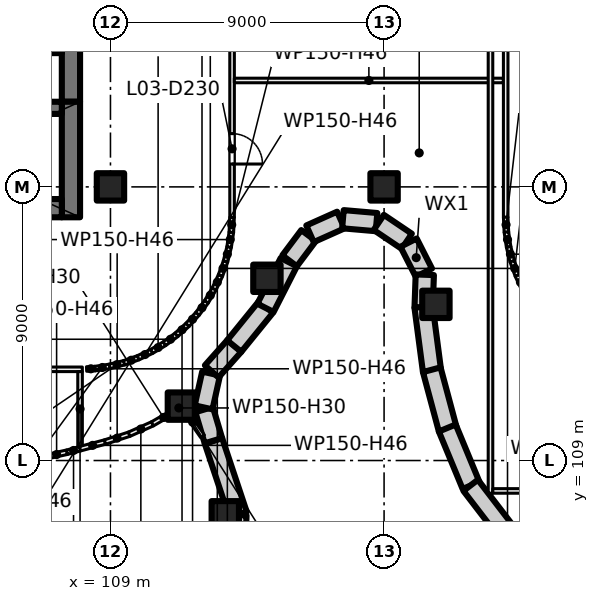
"""IFC4 building model, lengths in metres.
Left out: names, types, materials, properties, quantities, classifications, styles, units other than length and angle.
Written with IfcOpenShell. Run it as: python <this file> out.ifc"""

import sys

from ifc_helpers import new_model, si_unit, direction, frame, frame_2d, origin, origin_2d, place, context, subcontext, project, spatial, rectangle, extrude, element, fill, save


model = new_model("IFC4")
c1 = context("Model", 3, precision=1e-05, world=origin(), true_north=direction((0.0, 1.0)))
c2 = subcontext(c1, "Body", "Model", "MODEL_VIEW")
j1 = project(units=[si_unit("LENGTHUNIT", "METRE"), si_unit("PLANEANGLEUNIT", "RADIAN")], contexts=[c1])
p1 = place(None, origin())
s1 = spatial("IfcSite", under=j1, at=p1, CompositionType="ELEMENT")
p2 = place(p1, origin())
s2 = spatial("IfcBuilding", under=s1, at=p2, CompositionType="ELEMENT")
p3 = place(p2, frame((0.0, 0.0, 17.5)))
s3 = spatial("IfcBuildingStorey", under=s2, at=p3, CompositionType="ELEMENT", Elevation=17.5)
for number, where, z_axis, x_axis in (
    (1, (109.0, 118.0, 0.0), (0.0, 0.0, 1.0), (1.0, 0.0, 0.0)),
    (2, (118.0, 118.0, 0.0), (0.0, 0.0, 1.0), (1.0, 0.0, 0.0)),
    (3, (119.705, 114.137, 0.0), (0.0, 0.0, 1.0), (1.0, 0.0, 0.0)),
    (4, (114.146, 114.994, 0.0), (0.0, 0.0, 1.0), (1.0, 0.0, 0.0)),
    (5, (112.777, 107.215, 0.0), (0.0, 0.0, 1.0), (1.0, 0.0, 0.0)),
    (6, (111.333, 110.79, 0.0), (0.0, 0.0, 1.0), (1.0, 0.0, 0.0)),
):
    element("IfcColumn", number, at=place(p3, frame(where, z_axis=z_axis, x_axis=x_axis)), inside=s3, PredefinedType="COLUMN", context=c2, shape_type="SweptSolid", body=[
        extrude(rectangle(XDim=0.9, YDim=0.9, at=origin_2d()), origin(), (0.0, 0.0, 1.0), 5.0),
    ])
p4 = place(p3, frame((107.7, 135.2, 0.0), z_axis=(0.0, 0.0, 1.0), x_axis=(0.0, -1.0, 0.0)))
e7 = element("IfcWall", 7, at=p4, inside=s3, PredefinedType="SHEAR", context=c2, shape_type="SweptSolid", body=[
    extrude(rectangle(XDim=14.4, YDim=0.6, at=frame_2d((7.2, 0.0))), origin(), (0.0, 0.0, 1.0), 5.0),
])
p5 = place(p3, frame((107.7, 120.8, 0.0), z_axis=(0.0, 0.0, 1.0), x_axis=(0.0, -1.0, 0.0)))
e8 = element("IfcWall", 8, at=p5, inside=s3, PredefinedType="SHEAR", context=c2, shape_type="SweptSolid", body=[
    extrude(rectangle(XDim=3.8, YDim=0.6, at=frame_2d((1.9, 0.0))), origin(), (0.0, 0.0, 1.0), 5.0),
])
p6 = place(p3, frame((107.4, 117.3, 0.0), z_axis=(0.0, 0.0, 1.0), x_axis=(-1.0, 0.0, 0.0)))
e9 = element("IfcWall", 9, at=p6, inside=s3, PredefinedType="SHEAR", context=c2, shape_type="SweptSolid", body=[
    extrude(rectangle(XDim=7.8, YDim=0.6, at=frame_2d((3.9, 0.0))), origin(), (0.0, 0.0, 1.0), 5.0),
])
p7 = place(p3, frame((107.4, 120.6, 0.0), z_axis=(0.0, 0.0, 1.0), x_axis=(-1.0, 0.0, 0.0)))
e10 = element("IfcWall", 10, at=p7, inside=s3, PredefinedType="SHEAR", context=c2, shape_type="SweptSolid", body=[
    extrude(rectangle(XDim=7.8, YDim=0.4, at=frame_2d((3.9, 0.0))), origin(), (0.0, 0.0, 1.0), 5.0),
])
p8 = place(p3, frame((107.4, 122.6, 0.0), z_axis=(0.0, 0.0, 1.0), x_axis=(-1.0, 0.0, 0.0)))
e11 = element("IfcWall", 11, at=p8, inside=s3, PredefinedType="SHEAR", context=c2, shape_type="SweptSolid", body=[
    extrude(rectangle(XDim=12.2, YDim=0.4, at=frame_2d((6.1, 0.0))), origin(), (0.0, 0.0, 1.0), 5.0),
])
p9 = place(p8, frame((7.9, 0.0, 0.0)))
e12 = element("IfcOpeningElement", 12, at=p9, cuts=e11, PredefinedType="OPENING", context=c2, shape_type="SweptSolid", body=[
    extrude(rectangle(XDim=1.1, YDim=2.1, at=frame_2d((0.55, 1.05))), frame((0.0, 0.21, 0.0), z_axis=(0.0, -1.0, 0.0), x_axis=(1.0, 0.0, 0.0)), (0.0, 0.0, 1.0), 0.42),
])
p10 = place(p3, frame((113.177, 107.207, 0.0), z_axis=(0.0, 0.0, 1.0), x_axis=(-0.042001630397, -0.999117542156, 0.0)))
e13 = element("IfcWall", 13, at=p10, inside=s3, PredefinedType="SOLIDWALL", context=c2, shape_type="SweptSolid", body=[
    extrude(rectangle(XDim=2.436, YDim=0.6, at=frame_2d((1.218, 0.0))), origin(), (0.0, 0.0, 1.0), 4.6),
])
p11 = place(p3, frame((112.388, 109.643, 0.0), z_axis=(0.0, 0.0, 1.0), x_axis=(0.31642839289, -0.948616398853, 0.0)))
e14 = element("IfcWall", 14, at=p11, inside=s3, PredefinedType="SOLIDWALL", context=c2, shape_type="SweptSolid", body=[
    extrude(rectangle(XDim=2.555, YDim=0.6, at=frame_2d((1.278, 0.0))), origin(), (0.0, 0.0, 1.0), 4.6),
])
p12 = place(p3, frame((112.081, 110.676, 0.0), z_axis=(0.0, 0.0, 1.0), x_axis=(0.285396142495, -0.958409641985, 0.0)))
e15 = element("IfcWall", 15, at=p12, inside=s3, PredefinedType="SOLIDWALL", context=c2, shape_type="SweptSolid", body=[
    extrude(rectangle(XDim=1.068, YDim=0.6, at=frame_2d((0.534, 0.0))), origin(), (0.0, 0.0, 1.0), 4.6),
])
p13 = place(p3, frame((112.31, 111.859, 0.0), z_axis=(0.0, 0.0, 1.0), x_axis=(-0.216998636299, -0.976171906912, 0.0)))
e16 = element("IfcWall", 16, at=p13, inside=s3, PredefinedType="SOLIDWALL", context=c2, shape_type="SweptSolid", body=[
    extrude(rectangle(XDim=1.137, YDim=0.6, at=frame_2d((0.569, 0.0))), origin(), (0.0, 0.0, 1.0), 4.6),
])
p14 = place(p3, frame((113.079, 112.774, 0.0), z_axis=(0.0, 0.0, 1.0), x_axis=(-0.664538540083, -0.747253992123, 0.0)))
e17 = element("IfcWall", 17, at=p14, inside=s3, PredefinedType="SOLIDWALL", context=c2, shape_type="SweptSolid", body=[
    extrude(rectangle(XDim=1.127, YDim=0.6, at=frame_2d((0.564, 0.0))), origin(), (0.0, 0.0, 1.0), 4.6),
])
p15 = place(p3, frame((114.115, 114.051, 0.0), z_axis=(0.0, 0.0, 1.0), x_axis=(-0.630015715698, -0.77658238325, 0.0)))
e18 = element("IfcWall", 18, at=p15, inside=s3, PredefinedType="SOLIDWALL", context=c2, shape_type="SweptSolid", body=[
    extrude(rectangle(XDim=1.657, YDim=0.6, at=frame_2d((0.829, 0.0))), origin(), (0.0, 0.0, 1.0), 4.6),
])
p16 = place(p3, frame((114.865, 115.525, 0.0), z_axis=(0.0, 0.0, 1.0), x_axis=(-0.454203210797, -0.890898110505, 0.0)))
e19 = element("IfcWall", 19, at=p16, inside=s3, PredefinedType="SOLIDWALL", context=c2, shape_type="SweptSolid", body=[
    extrude(rectangle(XDim=1.687, YDim=0.6, at=frame_2d((0.844, 0.0))), origin(), (0.0, 0.0, 1.0), 4.6),
])
p17 = place(p3, frame((115.517, 116.4, 0.0), z_axis=(0.0, 0.0, 1.0), x_axis=(-0.60018790921, -0.799859033604, 0.0)))
e20 = element("IfcWall", 20, at=p17, inside=s3, PredefinedType="SOLIDWALL", context=c2, shape_type="SweptSolid", body=[
    extrude(rectangle(XDim=1.039, YDim=0.6, at=frame_2d((0.52, 0.0))), origin(), (0.0, 0.0, 1.0), 4.6),
])
for number, where, z_axis, x_axis in (
    (21, (116.577, 116.91, 0.0), (0.0, 0.0, 1.0), (-0.913, -0.408, 0.0)),
    (22, (117.752, 116.842, 0.0), (0.0, 0.0, 1.0), (-0.996, 0.086, 0.0)),
):
    element("IfcWall", number, at=place(p3, frame(where, z_axis=z_axis, x_axis=x_axis)), inside=s3, PredefinedType="SOLIDWALL", context=c2, shape_type="SweptSolid", body=[
        extrude(rectangle(XDim=1.11, YDim=0.6, at=frame_2d((0.555, 0.0))), origin(), (0.0, 0.0, 1.0), 4.6),
    ])
for number, where, z_axis, x_axis in (
    (23, (118.746, 116.211, 0.0), (0.0, 0.0, 1.0), (-0.829, 0.559, 0.0)),
    (24, (119.309, 115.178, 0.0), (0.0, 0.0, 1.0), (-0.454, 0.891, 0.0)),
):
    element("IfcWall", number, at=place(p3, frame(where, z_axis=z_axis, x_axis=x_axis)), inside=s3, PredefinedType="SOLIDWALL", context=c2, shape_type="SweptSolid", body=[
        extrude(rectangle(XDim=1.109, YDim=0.6, at=frame_2d((0.555, 0.0))), origin(), (0.0, 0.0, 1.0), 4.6),
    ])
p18 = place(p3, frame((119.3, 114.021, 0.0), z_axis=(0.0, 0.0, 1.0), x_axis=(0.035627591166, 0.999365135848, 0.0)))
e25 = element("IfcWall", 25, at=p18, inside=s3, PredefinedType="SOLIDWALL", context=c2, shape_type="SweptSolid", body=[
    extrude(rectangle(XDim=1.09, YDim=0.6, at=frame_2d((0.545, 0.0))), origin(), (0.0, 0.0, 1.0), 4.6),
])
p19 = place(p3, frame((119.576, 111.948, 0.0), z_axis=(0.0, 0.0, 1.0), x_axis=(-0.130558200013, 0.991440646942, 0.0)))
e26 = element("IfcWall", 26, at=p19, inside=s3, PredefinedType="SOLIDWALL", context=c2, shape_type="SweptSolid", body=[
    extrude(rectangle(XDim=2.132, YDim=0.6, at=frame_2d((1.066, 0.0))), origin(), (0.0, 0.0, 1.0), 4.6),
])
p20 = place(p3, frame((120.092, 110.032, 0.0), z_axis=(0.0, 0.0, 1.0), x_axis=(-0.258804467146, 0.965929732323, 0.0)))
e27 = element("IfcWall", 27, at=p20, inside=s3, PredefinedType="SOLIDWALL", context=c2, shape_type="SweptSolid", body=[
    extrude(rectangle(XDim=2.022, YDim=0.6, at=frame_2d((1.011, 0.0))), origin(), (0.0, 0.0, 1.0), 4.6),
])
p21 = place(p3, frame((120.86, 108.181, 0.0), z_axis=(0.0, 0.0, 1.0), x_axis=(-0.382341242798, 0.924021197839, 0.0)))
e28 = element("IfcWall", 28, at=p21, inside=s3, PredefinedType="SOLIDWALL", context=c2, shape_type="SweptSolid", body=[
    extrude(rectangle(XDim=2.044, YDim=0.6, at=frame_2d((1.022, 0.0))), origin(), (0.0, 0.0, 1.0), 4.6),
])
p22 = place(p3, frame((122.135, 106.507, 0.0), z_axis=(0.0, 0.0, 1.0), x_axis=(-0.609052002567, 0.79313029079, 0.0)))
e29 = element("IfcWall", 29, at=p22, inside=s3, PredefinedType="SOLIDWALL", context=c2, shape_type="SweptSolid", body=[
    extrude(rectangle(XDim=2.114, YDim=0.6, at=frame_2d((1.057, 0.0))), origin(), (0.0, 0.0, 1.0), 4.6),
])
p23 = place(p3, frame((108.075, 112.0, 0.0), z_axis=(0.0, 0.0, 1.0), x_axis=(-1.0, 0.0, 0.0)))
e30 = element("IfcWall", 30, at=p23, inside=s3, PredefinedType="PARTITIONING", context=c2, shape_type="SweptSolid", body=[
    extrude(rectangle(XDim=17.077, YDim=0.15, at=frame_2d((8.539, 0.0))), origin(), (0.0, 0.0, 1.0), 4.6),
])
p24 = place(p23, frame((14.823, 0.0, 0.0)))
e31 = element("IfcOpeningElement", 31, at=p24, cuts=e30, PredefinedType="OPENING", context=c2, shape_type="SweptSolid", body=[
    extrude(rectangle(XDim=1.0, YDim=2.1, at=frame_2d((0.5, 1.05))), frame((0.0, 0.085, 0.0), z_axis=(0.0, -1.0, 0.0), x_axis=(1.0, 0.0, 0.0)), (0.0, 0.0, 1.0), 0.17),
])
p25 = place(p23, frame((6.327, 0.0, 0.0)))
e32 = element("IfcOpeningElement", 32, at=p25, cuts=e30, PredefinedType="OPENING", context=c2, shape_type="SweptSolid", body=[
    extrude(rectangle(XDim=1.0, YDim=2.1, at=frame_2d((0.5, 1.05))), frame((0.0, 0.085, 0.0), z_axis=(0.0, -1.0, 0.0), x_axis=(1.0, 0.0, 0.0)), (0.0, 0.0, 1.0), 0.17),
])
p26 = place(p3, frame((106.886, 109.121, 0.0), z_axis=(0.0, 0.0, 1.0), x_axis=(0.976301537339, 0.216414667222, 0.0)))
e33 = element("IfcWall", 33, at=p26, inside=s3, PredefinedType="PARTITIONING", context=c2, shape_type="SweptSolid", body=[
    extrude(rectangle(XDim=0.702, YDim=0.15, at=frame_2d((0.351, 0.0))), origin(), (0.0, 0.0, 1.0), 4.6),
])
p27 = place(p3, frame((107.571, 109.273, 0.0), z_axis=(0.0, 0.0, 1.0), x_axis=(0.965896509383, 0.25892843251, 0.0)))
e34 = element("IfcWall", 34, at=p27, inside=s3, PredefinedType="PARTITIONING", context=c2, shape_type="SweptSolid", body=[
    extrude(rectangle(XDim=0.444, YDim=0.15, at=frame_2d((0.222, 0.0))), origin(), (0.0, 0.0, 1.0), 4.6),
])
p28 = place(p3, frame((108.0, 109.466, 0.0), z_axis=(0.0, 0.0, 1.0), x_axis=(0.0, 1.0, 0.0)))
e35 = element("IfcWall", 35, at=p28, inside=s3, PredefinedType="PARTITIONING", context=c2, shape_type="SweptSolid", body=[
    extrude(rectangle(XDim=2.459, YDim=0.15, at=frame_2d((1.229, 0.0))), origin(), (0.0, 0.0, 1.0), 3.6),
])
p29 = place(p3, frame((108.0, 109.388, 0.0), z_axis=(0.0, 0.0, 1.0), x_axis=(0.965800850795, 0.259285010374, 0.0)))
e36 = element("IfcWall", 36, at=p29, inside=s3, PredefinedType="PARTITIONING", context=c2, shape_type="SweptSolid", body=[
    extrude(rectangle(XDim=0.852, YDim=0.15, at=frame_2d((0.426, 0.0))), origin(), (0.0, 0.0, 1.0), 4.6),
])
p30 = place(p3, frame((108.214, 112.01, 0.0), z_axis=(0.0, 0.0, 1.0), x_axis=(0.99876534507, 0.049676810357, 0.0)))
e37 = element("IfcWall", 37, at=p30, inside=s3, PredefinedType="PARTITIONING", context=c2, shape_type="SweptSolid", body=[
    extrude(rectangle(XDim=0.28, YDim=0.15, at=frame_2d((0.14, 0.0))), origin(), (0.0, 0.0, 1.0), 4.6),
])
p31 = place(p3, frame((108.486, 112.023, 0.0), z_axis=(0.0, 0.0, 1.0), x_axis=(0.988925572052, 0.148412307247, 0.0)))
e38 = element("IfcWall", 38, at=p31, inside=s3, PredefinedType="PARTITIONING", context=c2, shape_type="SweptSolid", body=[
    extrude(rectangle(XDim=0.499, YDim=0.15, at=frame_2d((0.249, 0.0))), origin(), (0.0, 0.0, 1.0), 4.6),
])
p32 = place(p3, frame((108.819, 109.607, 0.0), z_axis=(0.0, 0.0, 1.0), x_axis=(0.95125726357, 0.308398473578, 0.0)))
e39 = element("IfcWall", 39, at=p32, inside=s3, PredefinedType="PARTITIONING", context=c2, shape_type="SweptSolid", body=[
    extrude(rectangle(XDim=0.843, YDim=0.15, at=frame_2d((0.421, 0.0))), origin(), (0.0, 0.0, 1.0), 4.6),
])
p33 = place(p3, frame((108.971, 112.095, 0.0), z_axis=(0.0, 0.0, 1.0), x_axis=(0.970113715952, 0.242650732785, 0.0)))
e40 = element("IfcWall", 40, at=p33, inside=s3, PredefinedType="PARTITIONING", context=c2, shape_type="SweptSolid", body=[
    extrude(rectangle(XDim=0.499, YDim=0.15, at=frame_2d((0.25, 0.0))), origin(), (0.0, 0.0, 1.0), 4.6),
])
p34 = place(p3, frame((109.447, 112.214, 0.0), z_axis=(0.0, 0.0, 1.0), x_axis=(0.941442168887, 0.3371744988, 0.0)))
e41 = element("IfcWall", 41, at=p34, inside=s3, PredefinedType="PARTITIONING", context=c2, shape_type="SweptSolid", body=[
    extrude(rectangle(XDim=0.498, YDim=0.15, at=frame_2d((0.249, 0.0))), origin(), (0.0, 0.0, 1.0), 4.6),
])
p35 = place(p3, frame((109.613, 109.864, 0.0), z_axis=(0.0, 0.0, 1.0), x_axis=(0.913180057383, 0.407556355364, 0.0)))
e42 = element("IfcWall", 42, at=p35, inside=s3, PredefinedType="PARTITIONING", context=c2, shape_type="SweptSolid", body=[
    extrude(rectangle(XDim=0.846, YDim=0.15, at=frame_2d((0.423, 0.0))), origin(), (0.0, 0.0, 1.0), 3.6),
])
p36 = place(p3, frame((109.91, 112.379, 0.0), z_axis=(0.0, 0.0, 1.0), x_axis=(0.903827641978, 0.427896709028, 0.0)))
e43 = element("IfcWall", 43, at=p36, inside=s3, PredefinedType="PARTITIONING", context=c2, shape_type="SweptSolid", body=[
    extrude(rectangle(XDim=0.498, YDim=0.15, at=frame_2d((0.249, 0.0))), origin(), (0.0, 0.0, 1.0), 4.6),
])
p37 = place(p3, frame((110.354, 112.588, 0.0), z_axis=(0.0, 0.0, 1.0), x_axis=(0.85671397893, 0.515791778052, 0.0)))
e44 = element("IfcWall", 44, at=p37, inside=s3, PredefinedType="PARTITIONING", context=c2, shape_type="SweptSolid", body=[
    extrude(rectangle(XDim=0.499, YDim=0.15, at=frame_2d((0.249, 0.0))), origin(), (0.0, 0.0, 1.0), 4.6),
])
p38 = place(p3, frame((110.379, 110.205, 0.0), z_axis=(0.0, 0.0, 1.0), x_axis=(0.865670246418, 0.500614646676, 0.0)))
e45 = element("IfcWall", 45, at=p38, inside=s3, PredefinedType="PARTITIONING", context=c2, shape_type="SweptSolid", body=[
    extrude(rectangle(XDim=0.845, YDim=0.15, at=frame_2d((0.422, 0.0))), origin(), (0.0, 0.0, 1.0), 3.0),
])
p39 = place(p3, frame((110.775, 112.841, 0.0), z_axis=(0.0, 0.0, 1.0), x_axis=(0.80404358372, 0.594570362092, 0.0)))
e46 = element("IfcWall", 46, at=p39, inside=s3, PredefinedType="PARTITIONING", context=c2, shape_type="SweptSolid", body=[
    extrude(rectangle(XDim=0.498, YDim=0.15, at=frame_2d((0.249, 0.0))), origin(), (0.0, 0.0, 1.0), 4.6),
])
p40 = place(p3, frame((111.104, 110.624, 0.0), z_axis=(0.0, 0.0, 1.0), x_axis=(0.810031464643, 0.586386413799, 0.0)))
e47 = element("IfcWall", 47, at=p40, inside=s3, PredefinedType="PARTITIONING", context=c2, shape_type="SweptSolid", body=[
    extrude(rectangle(XDim=0.358, YDim=0.15, at=frame_2d((0.179, 0.0))), origin(), (0.0, 0.0, 1.0), 3.0),
])
p41 = place(p3, frame((111.169, 113.133, 0.0), z_axis=(0.0, 0.0, 1.0), x_axis=(0.742416880587, 0.66993818776, 0.0)))
e48 = element("IfcWall", 48, at=p41, inside=s3, PredefinedType="PARTITIONING", context=c2, shape_type="SweptSolid", body=[
    extrude(rectangle(XDim=0.499, YDim=0.15, at=frame_2d((0.249, 0.0))), origin(), (0.0, 0.0, 1.0), 4.6),
])
p42 = place(p3, frame((111.376, 110.729, 0.0), z_axis=(0.0, 0.0, 1.0), x_axis=(0.573347602385, -0.819312227933, 0.0)))
e49 = element("IfcWall", 49, at=p42, inside=s3, PredefinedType="PARTITIONING", context=c2, shape_type="SweptSolid", body=[
    extrude(rectangle(XDim=1.143, YDim=0.15, at=frame_2d((0.571, 0.0))), origin(), (0.0, 0.0, 1.0), 3.0),
])
p43 = place(p3, frame((111.533, 113.461, 0.0), z_axis=(0.0, 0.0, 1.0), x_axis=(0.66993818776, 0.742416880587, 0.0)))
e50 = element("IfcWall", 50, at=p43, inside=s3, PredefinedType="PARTITIONING", context=c2, shape_type="SweptSolid", body=[
    extrude(rectangle(XDim=0.499, YDim=0.15, at=frame_2d((0.249, 0.0))), origin(), (0.0, 0.0, 1.0), 4.6),
])
p44 = place(p3, frame((111.863, 113.825, 0.0), z_axis=(0.0, 0.0, 1.0), x_axis=(0.594570362092, 0.80404358372, 0.0)))
e51 = element("IfcWall", 51, at=p44, inside=s3, PredefinedType="PARTITIONING", context=c2, shape_type="SweptSolid", body=[
    extrude(rectangle(XDim=0.498, YDim=0.15, at=frame_2d((0.249, 0.0))), origin(), (0.0, 0.0, 1.0), 4.6),
])
p45 = place(p3, frame((112.155, 114.219, 0.0), z_axis=(0.0, 0.0, 1.0), x_axis=(0.515791778052, 0.85671397893, 0.0)))
e52 = element("IfcWall", 52, at=p45, inside=s3, PredefinedType="PARTITIONING", context=c2, shape_type="SweptSolid", body=[
    extrude(rectangle(XDim=0.499, YDim=0.15, at=frame_2d((0.249, 0.0))), origin(), (0.0, 0.0, 1.0), 4.6),
])
for number, where, z_axis, x_axis in (
    (53, (112.408, 114.64, 0.0), (0.0, 0.0, 1.0), (0.428, 0.904, 0.0)),
    (54, (112.618, 115.084, 0.0), (0.0, 0.0, 1.0), (0.337, 0.941, 0.0)),
):
    element("IfcWall", number, at=place(p3, frame(where, z_axis=z_axis, x_axis=x_axis)), inside=s3, PredefinedType="PARTITIONING", context=c2, shape_type="SweptSolid", body=[
        extrude(rectangle(XDim=0.498, YDim=0.15, at=frame_2d((0.249, 0.0))), origin(), (0.0, 0.0, 1.0), 4.6),
    ])
p46 = place(p3, frame((112.784, 115.545, 0.0), z_axis=(0.0, 0.0, 1.0), x_axis=(0.242650732785, 0.970113715952, 0.0)))
e55 = element("IfcWall", 55, at=p46, inside=s3, PredefinedType="PARTITIONING", context=c2, shape_type="SweptSolid", body=[
    extrude(rectangle(XDim=0.499, YDim=0.15, at=frame_2d((0.25, 0.0))), origin(), (0.0, 0.0, 1.0), 4.6),
])
p47 = place(p3, frame((112.903, 116.021, 0.0), z_axis=(0.0, 0.0, 1.0), x_axis=(0.148412307247, 0.988925572052, 0.0)))
e56 = element("IfcWall", 56, at=p47, inside=s3, PredefinedType="PARTITIONING", context=c2, shape_type="SweptSolid", body=[
    extrude(rectangle(XDim=0.499, YDim=0.15, at=frame_2d((0.249, 0.0))), origin(), (0.0, 0.0, 1.0), 4.6),
])
p48 = place(p3, frame((112.976, 116.506, 0.0), z_axis=(0.0, 0.0, 1.0), x_axis=(0.048196018647, 0.998837896651, 0.0)))
e57 = element("IfcWall", 57, at=p48, inside=s3, PredefinedType="PARTITIONING", context=c2, shape_type="SweptSolid", body=[
    extrude(rectangle(XDim=0.496, YDim=0.15, at=frame_2d((0.248, 0.0))), origin(), (0.0, 0.0, 1.0), 4.6),
])
p49 = place(p3, frame((113.0, 139.002, 0.0), z_axis=(0.0, 0.0, 1.0), x_axis=(0.0, -1.0, 0.0)))
e58 = element("IfcWall", 58, at=p49, inside=s3, PredefinedType="PARTITIONING", context=c2, shape_type="SweptSolid", body=[
    extrude(rectangle(XDim=22.004, YDim=0.15, at=frame_2d((11.002, 0.0))), origin(), (0.0, 0.0, 1.0), 4.6),
])
p50 = place(p49, frame((19.25, 0.0, 0.0)))
e59 = element("IfcOpeningElement", 59, at=p50, cuts=e58, PredefinedType="OPENING", context=c2, shape_type="SweptSolid", body=[
    extrude(rectangle(XDim=1.0, YDim=2.1, at=frame_2d((0.5, 1.05))), frame((0.0, 0.085, 0.0), z_axis=(0.0, -1.0, 0.0), x_axis=(1.0, 0.0, 0.0)), (0.0, 0.0, 1.0), 0.17),
])
p51 = place(p49, frame((10.252, 0.0, 0.0)))
e60 = element("IfcOpeningElement", 60, at=p51, cuts=e58, PredefinedType="OPENING", context=c2, shape_type="SweptSolid", body=[
    extrude(rectangle(XDim=1.0, YDim=2.1, at=frame_2d((0.5, 1.05))), frame((0.0, 0.085, 0.0), z_axis=(0.0, -1.0, 0.0), x_axis=(1.0, 0.0, 0.0)), (0.0, 0.0, 1.0), 0.17),
])
p52 = place(p49, frame((1.504, 0.0, 0.0)))
e61 = element("IfcOpeningElement", 61, at=p52, cuts=e58, PredefinedType="OPENING", context=c2, shape_type="SweptSolid", body=[
    extrude(rectangle(XDim=1.0, YDim=2.1, at=frame_2d((0.5, 1.05))), frame((0.0, 0.085, 0.0), z_axis=(0.0, -1.0, 0.0), x_axis=(1.0, 0.0, 0.0)), (0.0, 0.0, 1.0), 0.17),
])
p53 = place(p3, frame((113.075, 121.5, 0.0), z_axis=(0.0, 0.0, 1.0), x_axis=(1.0, 0.0, 0.0)))
e62 = element("IfcWall", 62, at=p53, inside=s3, PredefinedType="PARTITIONING", context=c2, shape_type="SweptSolid", body=[
    extrude(rectangle(XDim=8.85, YDim=0.15, at=frame_2d((4.425, 0.0))), origin(), (0.0, 0.0, 1.0), 4.6),
])
p54 = place(p3, frame((121.5, 107.925, 0.0), z_axis=(0.0, 0.0, 1.0), x_axis=(0.0, 1.0, 0.0)))
e63 = element("IfcWall", 63, at=p54, inside=s3, PredefinedType="PARTITIONING", context=c2, shape_type="SweptSolid", body=[
    extrude(rectangle(XDim=40.247, YDim=0.15, at=frame_2d((20.124, 0.0))), origin(), (0.0, 0.0, 1.0), 4.6),
])
p55 = place(p3, frame((121.575, 108.0, 0.0), z_axis=(0.0, 0.0, 1.0), x_axis=(1.0, 0.0, 0.0)))
e64 = element("IfcWall", 64, at=p55, inside=s3, PredefinedType="PARTITIONING", context=c2, shape_type="SweptSolid", body=[
    extrude(rectangle(XDim=13.5, YDim=0.15, at=frame_2d((6.75, 0.0))), origin(), (0.0, 0.0, 1.0), 4.6),
])
p56 = place(p3, frame((122.0, 139.002, 0.0), z_axis=(0.0, 0.0, 1.0), x_axis=(0.0, -1.0, 0.0)))
e65 = element("IfcWall", 65, at=p56, inside=s3, PredefinedType="PARTITIONING", context=c2, shape_type="SweptSolid", body=[
    extrude(rectangle(XDim=22.004, YDim=0.15, at=frame_2d((11.002, 0.0))), origin(), (0.0, 0.0, 1.0), 4.6),
])
p57 = place(p56, frame((10.252, 0.0, 0.0)))
e66 = element("IfcOpeningElement", 66, at=p57, cuts=e65, PredefinedType="OPENING", context=c2, shape_type="SweptSolid", body=[
    extrude(rectangle(XDim=1.0, YDim=2.1, at=frame_2d((0.5, 1.05))), frame((0.0, 0.085, 0.0), z_axis=(0.0, -1.0, 0.0), x_axis=(1.0, 0.0, 0.0)), (0.0, 0.0, 1.0), 0.17),
])
p58 = place(p3, frame((122.0, 117.002, 0.0), z_axis=(0.0, 0.0, 1.0), x_axis=(0.048196018647, -0.998837896651, 0.0)))
e67 = element("IfcWall", 67, at=p58, inside=s3, PredefinedType="PARTITIONING", context=c2, shape_type="SweptSolid", body=[
    extrude(rectangle(XDim=0.496, YDim=0.15, at=frame_2d((0.248, 0.0))), origin(), (0.0, 0.0, 1.0), 4.6),
])
p59 = place(p3, frame((122.023, 116.514, 0.0), z_axis=(0.0, 0.0, 1.0), x_axis=(0.148412307247, -0.988925572052, 0.0)))
e68 = element("IfcWall", 68, at=p59, inside=s3, PredefinedType="PARTITIONING", context=c2, shape_type="SweptSolid", body=[
    extrude(rectangle(XDim=0.499, YDim=0.15, at=frame_2d((0.249, 0.0))), origin(), (0.0, 0.0, 1.0), 4.6),
])
p60 = place(p3, frame((122.095, 116.029, 0.0), z_axis=(0.0, 0.0, 1.0), x_axis=(0.242650732785, -0.970113715952, 0.0)))
e69 = element("IfcWall", 69, at=p60, inside=s3, PredefinedType="PARTITIONING", context=c2, shape_type="SweptSolid", body=[
    extrude(rectangle(XDim=0.499, YDim=0.15, at=frame_2d((0.25, 0.0))), origin(), (0.0, 0.0, 1.0), 4.6),
])
for number, where, z_axis, x_axis in (
    (70, (122.214, 115.553, 0.0), (0.0, 0.0, 1.0), (0.337, -0.941, 0.0)),
    (71, (122.379, 115.09, 0.0), (0.0, 0.0, 1.0), (0.428, -0.904, 0.0)),
):
    element("IfcWall", number, at=place(p3, frame(where, z_axis=z_axis, x_axis=x_axis)), inside=s3, PredefinedType="PARTITIONING", context=c2, shape_type="SweptSolid", body=[
        extrude(rectangle(XDim=0.498, YDim=0.15, at=frame_2d((0.249, 0.0))), origin(), (0.0, 0.0, 1.0), 4.6),
    ])
p61 = place(p50, origin())
e72 = element("IfcDoor", 72, at=p61, inside=s3, OperationType="SINGLE_SWING_RIGHT", PredefinedType="DOOR", context=c2, shape_type="SweptSolid", body=[
    extrude(rectangle(XDim=1.0, YDim=2.1, at=frame_2d((0.5, 1.05))), frame((0.0, 0.025, 0.0), z_axis=(0.0, -1.0, 0.0), x_axis=(1.0, 0.0, 0.0)), (0.0, 0.0, 1.0), 0.05),
])
fill(e59, e72)
save(model, sys.argv[1])
